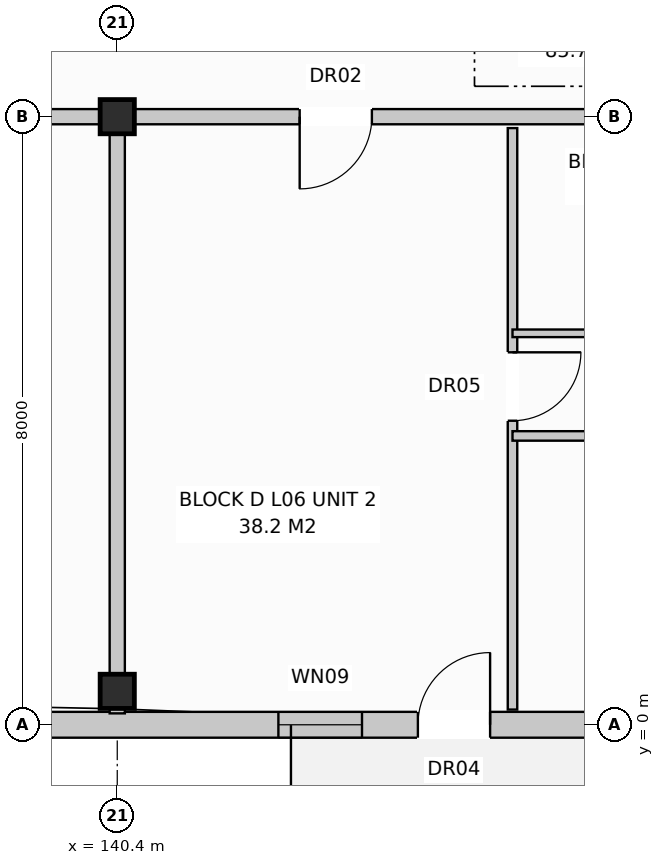
"""IFC4 building model, lengths in metres.
Left out: names, types, materials, properties, quantities, classifications, styles, units other than length and angle.
Written with IfcOpenShell. Run it as: python <this file> out.ifc"""

import sys

from ifc_helpers import new_model, si_unit, direction, frame, frame_2d, origin, origin_with_axes, origin_2d, place, context, subcontext, project, spatial, rectangle, extrude, element, fill, save


model = new_model("IFC4")
c1 = context("Model", 3, precision=1e-05, world=origin(), true_north=direction((0.0, 1.0)))
c2 = subcontext(c1, "Body", "Model", "MODEL_VIEW")
j1 = project(units=[si_unit("LENGTHUNIT", "METRE"), si_unit("PLANEANGLEUNIT", "RADIAN")], contexts=[c1])
p1 = place(None, origin())
s1 = spatial("IfcSite", under=j1, at=p1, CompositionType="ELEMENT")
p2 = place(p1, origin())
s2 = spatial("IfcBuilding", under=s1, at=p2, CompositionType="ELEMENT")
p3 = place(p2, frame((0.0, 0.0, 20.8)))
s3 = spatial("IfcBuildingStorey", under=s2, at=p3, CompositionType="ELEMENT", Elevation=20.8)
for number, where, z_axis, x_axis in (
    (1, (140.4, 0.44, 0.0), (0.0, 0.0, 1.0), (1.0, 0.0, 0.0)),
    (2, (140.4, 8.0, 0.0), (0.0, 0.0, 1.0), (1.0, 0.0, 0.0)),
):
    element("IfcColumn", number, at=place(p3, frame(where, z_axis=z_axis, x_axis=x_axis)), inside=s3, PredefinedType="COLUMN", context=c2, shape_type="SweptSolid", body=[
        extrude(rectangle(XDim=0.45, YDim=0.45, at=origin_2d()), origin(), (0.0, 0.0, 1.0), 3.2),
    ])
p4 = place(p3, frame((126.76, 0.0, 0.0), z_axis=(0.0, 0.0, 1.0), x_axis=(1.0, 0.0, 0.0)))
e3 = element("IfcWall", 3, at=p4, inside=s3, PredefinedType="STANDARD", context=c2, shape_type="SweptSolid", body=[
    extrude(rectangle(XDim=41.08, YDim=0.34, at=frame_2d((20.54, 0.0))), origin(), (0.0, 0.0, 1.0), 2.95),
])
p5 = place(p4, frame((2.795, 0.0, 0.0)))
e4 = element("IfcOpeningElement", 4, at=p5, cuts=e3, PredefinedType="OPENING", context=c2, shape_type="SweptSolid", body=[
    extrude(rectangle(XDim=0.95, YDim=2.1, at=frame_2d((0.475, 1.05))), frame((0.0, 0.182, 0.0), z_axis=(0.0, -1.0, 0.0), x_axis=(1.0, 0.0, 0.0)), (0.0, 0.0, 1.0), 0.364),
])
p6 = place(p4, frame((17.595, 0.0, 0.0)))
e5 = element("IfcOpeningElement", 5, at=p6, cuts=e3, PredefinedType="OPENING", context=c2, shape_type="SweptSolid", body=[
    extrude(rectangle(XDim=0.95, YDim=2.1, at=frame_2d((0.475, 1.05))), frame((0.0, 0.182, 0.0), z_axis=(0.0, -1.0, 0.0), x_axis=(1.0, 0.0, 0.0)), (0.0, 0.0, 1.0), 0.364),
])
p7 = place(p4, frame((30.095, 0.0, 0.0)))
e6 = element("IfcOpeningElement", 6, at=p7, cuts=e3, PredefinedType="OPENING", context=c2, shape_type="SweptSolid", body=[
    extrude(rectangle(XDim=0.95, YDim=2.1, at=frame_2d((0.475, 1.05))), frame((0.0, 0.182, 0.0), z_axis=(0.0, -1.0, 0.0), x_axis=(1.0, 0.0, 0.0)), (0.0, 0.0, 1.0), 0.364),
])
p8 = place(p4, frame((0.63, 0.0, 0.8)))
e7 = element("IfcOpeningElement", 7, at=p8, cuts=e3, PredefinedType="OPENING", context=c2, shape_type="SweptSolid", body=[
    extrude(rectangle(XDim=1.8, YDim=1.7, at=frame_2d((0.9, 0.85))), frame((0.0, 0.182, 0.0), z_axis=(0.0, -1.0, 0.0), x_axis=(1.0, 0.0, 0.0)), (0.0, 0.0, 1.0), 0.364),
])
p9 = place(p4, frame((4.36, 0.0, 0.72)))
e8 = element("IfcOpeningElement", 8, at=p9, cuts=e3, PredefinedType="OPENING", context=c2, shape_type="SweptSolid", body=[
    extrude(rectangle(XDim=1.9, YDim=1.85, at=frame_2d((0.95, 0.925))), frame((0.0, 0.182, 0.0), z_axis=(0.0, -1.0, 0.0), x_axis=(1.0, 0.0, 0.0)), (0.0, 0.0, 1.0), 0.364),
])
p10 = place(p4, frame((10.46, 0.0, 0.72)))
e9 = element("IfcOpeningElement", 9, at=p10, cuts=e3, PredefinedType="OPENING", context=c2, shape_type="SweptSolid", body=[
    extrude(rectangle(XDim=1.1, YDim=1.5, at=frame_2d((0.55, 0.75))), frame((0.0, 0.182, 0.0), z_axis=(0.0, -1.0, 0.0), x_axis=(1.0, 0.0, 0.0)), (0.0, 0.0, 1.0), 0.364),
])
p11 = place(p4, frame((15.76, 0.0, 0.72)))
e10 = element("IfcOpeningElement", 10, at=p11, cuts=e3, PredefinedType="OPENING", context=c2, shape_type="SweptSolid", body=[
    extrude(rectangle(XDim=1.1, YDim=1.5, at=frame_2d((0.55, 0.75))), frame((0.0, 0.182, 0.0), z_axis=(0.0, -1.0, 0.0), x_axis=(1.0, 0.0, 0.0)), (0.0, 0.0, 1.0), 0.364),
])
p12 = place(p4, frame((21.042, 0.0, 0.72)))
e11 = element("IfcOpeningElement", 11, at=p12, cuts=e3, PredefinedType="OPENING", context=c2, shape_type="SweptSolid", body=[
    extrude(rectangle(XDim=1.9, YDim=1.85, at=frame_2d((0.95, 0.925))), frame((0.0, 0.182, 0.0), z_axis=(0.0, -1.0, 0.0), x_axis=(1.0, 0.0, 0.0)), (0.0, 0.0, 1.0), 0.364),
])
p13 = place(p4, frame((24.66, 0.0, 0.72)))
e12 = element("IfcOpeningElement", 12, at=p13, cuts=e3, PredefinedType="OPENING", context=c2, shape_type="SweptSolid", body=[
    extrude(rectangle(XDim=1.1, YDim=1.5, at=frame_2d((0.55, 0.75))), frame((0.0, 0.182, 0.0), z_axis=(0.0, -1.0, 0.0), x_axis=(1.0, 0.0, 0.0)), (0.0, 0.0, 1.0), 0.364),
])
p14 = place(p4, frame((28.21, 0.0, 0.85)))
e13 = element("IfcOpeningElement", 13, at=p14, cuts=e3, PredefinedType="OPENING", context=c2, shape_type="SweptSolid", body=[
    extrude(rectangle(XDim=1.5, YDim=1.65, at=frame_2d((0.75, 0.825))), frame((0.0, 0.182, 0.0), z_axis=(0.0, -1.0, 0.0), x_axis=(1.0, 0.0, 0.0)), (0.0, 0.0, 1.0), 0.364),
])
p15 = place(p4, frame((31.86, 0.0, 0.72)))
e14 = element("IfcOpeningElement", 14, at=p15, cuts=e3, PredefinedType="OPENING", context=c2, shape_type="SweptSolid", body=[
    extrude(rectangle(XDim=1.9, YDim=1.85, at=frame_2d((0.95, 0.925))), frame((0.0, 0.182, 0.0), z_axis=(0.0, -1.0, 0.0), x_axis=(1.0, 0.0, 0.0)), (0.0, 0.0, 1.0), 0.364),
])
p16 = place(p4, frame((35.335, 0.0, 0.8)))
e15 = element("IfcOpeningElement", 15, at=p16, cuts=e3, PredefinedType="OPENING", context=c2, shape_type="SweptSolid", body=[
    extrude(rectangle(XDim=1.95, YDim=1.65, at=frame_2d((0.975, 0.825))), frame((0.0, 0.182, 0.0), z_axis=(0.0, -1.0, 0.0), x_axis=(1.0, 0.0, 0.0)), (0.0, 0.0, 1.0), 0.364),
])
p17 = place(p4, frame((38.65, 0.0, 0.8)))
e16 = element("IfcOpeningElement", 16, at=p17, cuts=e3, PredefinedType="OPENING", context=c2, shape_type="SweptSolid", body=[
    extrude(rectangle(XDim=1.8, YDim=1.7, at=frame_2d((0.9, 0.85))), frame((0.0, 0.182, 0.0), z_axis=(0.0, -1.0, 0.0), x_axis=(1.0, 0.0, 0.0)), (0.0, 0.0, 1.0), 0.364),
])
p18 = place(p3, frame((140.4, 7.85, 0.0), z_axis=(0.0, 0.0, 1.0), x_axis=(0.0, -1.0, 0.0)))
e17 = element("IfcWall", 17, at=p18, inside=s3, PredefinedType="PARTITIONING", context=c2, shape_type="SweptSolid", body=[
    extrude(rectangle(XDim=7.7, YDim=0.2, at=frame_2d((3.85, 0.0))), origin(), (0.0, 0.0, 1.0), 2.95),
])
p19 = place(p3, frame((126.6, 8.0, 0.0), z_axis=(0.0, 0.0, 1.0), x_axis=(1.0, 0.0, 0.0)))
e18 = element("IfcWall", 18, at=p19, inside=s3, PredefinedType="PARTITIONING", context=c2, shape_type="SweptSolid", body=[
    extrude(rectangle(XDim=13.8, YDim=0.2, at=frame_2d((6.9, 0.0))), origin(), (0.0, 0.0, 1.0), 2.39),
])
p20 = place(p19, frame((9.6, 0.0, 0.0)))
e19 = element("IfcOpeningElement", 19, at=p20, cuts=e18, PredefinedType="OPENING", context=c2, shape_type="SweptSolid", body=[
    extrude(rectangle(XDim=0.95, YDim=2.15, at=frame_2d((0.475, 1.075))), frame((0.0, 0.112, 0.0), z_axis=(0.0, -1.0, 0.0), x_axis=(1.0, 0.0, 0.0)), (0.0, 0.0, 1.0), 0.224),
])
p21 = place(p3, frame((140.4, 8.0, 0.0), z_axis=(0.0, 0.0, 1.0), x_axis=(1.0, 0.0, 0.0)))
e20 = element("IfcWall", 20, at=p21, inside=s3, PredefinedType="PARTITIONING", context=c2, shape_type="SweptSolid", body=[
    extrude(rectangle(XDim=13.8, YDim=0.2, at=frame_2d((6.9, 0.0))), origin(), (0.0, 0.0, 1.0), 2.39),
])
p22 = place(p21, frame((2.4, 0.0, 0.0)))
e21 = element("IfcOpeningElement", 21, at=p22, cuts=e20, PredefinedType="OPENING", context=c2, shape_type="SweptSolid", body=[
    extrude(rectangle(XDim=0.95, YDim=2.15, at=frame_2d((0.475, 1.075))), frame((0.0, 0.112, 0.0), z_axis=(0.0, -1.0, 0.0), x_axis=(1.0, 0.0, 0.0)), (0.0, 0.0, 1.0), 0.224),
])
p23 = place(p3, frame((145.6, 7.85, 0.0), z_axis=(0.0, 0.0, 1.0), x_axis=(0.0, -1.0, 0.0)))
e22 = element("IfcWall", 22, at=p23, inside=s3, PredefinedType="PARTITIONING", context=c2, shape_type="SweptSolid", body=[
    extrude(rectangle(XDim=7.65, YDim=0.125, at=frame_2d((3.825, 0.0))), origin(), (0.0, 0.0, 1.0), 2.95),
])
p24 = place(p23, frame((2.95, 0.0, 0.0)))
e23 = element("IfcOpeningElement", 23, at=p24, cuts=e22, PredefinedType="OPENING", context=c2, shape_type="SweptSolid", body=[
    extrude(rectangle(XDim=0.9, YDim=2.1, at=frame_2d((0.45, 1.05))), frame((0.0, 0.074, 0.0), z_axis=(0.0, -1.0, 0.0), x_axis=(1.0, 0.0, 0.0)), (0.0, 0.0, 1.0), 0.149),
])
p25 = place(p3, frame((145.6, 5.15, 0.0), z_axis=(0.0, 0.0, 1.0), x_axis=(1.0, 0.0, 0.0)))
e24 = element("IfcWall", 24, at=p25, inside=s3, PredefinedType="PARTITIONING", context=c2, shape_type="SweptSolid", body=[
    extrude(rectangle(XDim=8.5, YDim=0.1, at=frame_2d((4.25, 0.0))), origin(), (0.0, 0.0, 1.0), 2.95),
])
p26 = place(p25, frame((1.0, 0.0, 0.0)))
e25 = element("IfcOpeningElement", 25, at=p26, cuts=e24, PredefinedType="OPENING", context=c2, shape_type="SweptSolid", body=[
    extrude(rectangle(XDim=0.85, YDim=2.1, at=frame_2d((0.425, 1.05))), frame((0.0, 0.062, 0.0), z_axis=(0.0, -1.0, 0.0), x_axis=(1.0, 0.0, 0.0)), (0.0, 0.0, 1.0), 0.124),
])
p27 = place(p25, frame((3.4, 0.0, 0.0)))
e26 = element("IfcOpeningElement", 26, at=p27, cuts=e24, PredefinedType="OPENING", context=c2, shape_type="SweptSolid", body=[
    extrude(rectangle(XDim=0.85, YDim=2.05, at=frame_2d((0.425, 1.025))), frame((0.0, 0.062, 0.0), z_axis=(0.0, -1.0, 0.0), x_axis=(1.0, 0.0, 0.0)), (0.0, 0.0, 1.0), 0.124),
])
p28 = place(p25, frame((6.2, 0.0, 0.0)))
e27 = element("IfcOpeningElement", 27, at=p28, cuts=e24, PredefinedType="OPENING", context=c2, shape_type="SweptSolid", body=[
    extrude(rectangle(XDim=0.85, YDim=2.05, at=frame_2d((0.425, 1.025))), frame((0.0, 0.062, 0.0), z_axis=(0.0, -1.0, 0.0), x_axis=(1.0, 0.0, 0.0)), (0.0, 0.0, 1.0), 0.124),
])
p29 = place(p3, frame((145.6, 3.8, 0.0), z_axis=(0.0, 0.0, 1.0), x_axis=(1.0, 0.0, 0.0)))
e28 = element("IfcWall", 28, at=p29, inside=s3, PredefinedType="PARTITIONING", context=c2, shape_type="SweptSolid", body=[
    extrude(rectangle(XDim=8.5, YDim=0.125, at=frame_2d((4.25, 0.0))), origin(), (0.0, 0.0, 1.0), 2.95),
])
p30 = place(p29, frame((1.5, 0.0, 0.0)))
e29 = element("IfcOpeningElement", 29, at=p30, cuts=e28, PredefinedType="OPENING", context=c2, shape_type="SweptSolid", body=[
    extrude(rectangle(XDim=0.9, YDim=2.1, at=frame_2d((0.45, 1.05))), frame((0.0, 0.074, 0.0), z_axis=(0.0, -1.0, 0.0), x_axis=(1.0, 0.0, 0.0)), (0.0, 0.0, 1.0), 0.149),
])
p31 = place(p29, frame((5.6, 0.0, 0.0)))
e30 = element("IfcOpeningElement", 30, at=p31, cuts=e28, PredefinedType="OPENING", context=c2, shape_type="SweptSolid", body=[
    extrude(rectangle(XDim=0.9, YDim=2.1, at=frame_2d((0.45, 1.05))), frame((0.0, 0.074, 0.0), z_axis=(0.0, -1.0, 0.0), x_axis=(1.0, 0.0, 0.0)), (0.0, 0.0, 1.0), 0.149),
])
p32 = place(p6, origin_with_axes())
e31 = element("IfcDoor", 31, at=p32, inside=s3, OperationType="SINGLE_SWING_RIGHT", PredefinedType="DOOR", context=c2, shape_type="SweptSolid", body=[
    extrude(rectangle(XDim=0.95, YDim=2.1, at=frame_2d((0.475, 1.05))), frame((0.0, 0.025, 0.0), z_axis=(0.0, -1.0, 0.0), x_axis=(1.0, 0.0, 0.0)), (0.0, 0.0, 1.0), 0.05),
])
fill(e5, e31)
p33 = place(p11, origin_with_axes())
e32 = element("IfcWindow", 32, at=p33, inside=s3, PartitioningType="SINGLE_PANEL", PredefinedType="WINDOW", context=c2, shape_type="SweptSolid", body=[
    extrude(rectangle(XDim=1.1, YDim=1.5, at=frame_2d((0.55, 0.75))), frame((0.0, 0.03, 0.0), z_axis=(0.0, -1.0, 0.0), x_axis=(1.0, 0.0, 0.0)), (0.0, 0.0, 1.0), 0.06),
])
fill(e10, e32)
p34 = place(p22, frame((0.95, 0.0, 0.0), z_axis=(0.0, 0.0, 1.0), x_axis=(-1.0, 0.0, 0.0)))
e33 = element("IfcDoor", 33, at=p34, inside=s3, OperationType="SINGLE_SWING_LEFT", PredefinedType="DOOR", context=c2, shape_type="SweptSolid", body=[
    extrude(rectangle(XDim=0.95, YDim=2.15, at=frame_2d((0.475, 1.075))), frame((0.0, 0.025, 0.0), z_axis=(0.0, -1.0, 0.0), x_axis=(1.0, 0.0, 0.0)), (0.0, 0.0, 1.0), 0.05),
])
fill(e21, e33)
p35 = place(p24, origin_with_axes())
e34 = element("IfcDoor", 34, at=p35, inside=s3, OperationType="SINGLE_SWING_LEFT", PredefinedType="DOOR", context=c2, shape_type="SweptSolid", body=[
    extrude(rectangle(XDim=0.9, YDim=2.1, at=frame_2d((0.45, 1.05))), frame((0.0, 0.025, 0.0), z_axis=(0.0, -1.0, 0.0), x_axis=(1.0, 0.0, 0.0)), (0.0, 0.0, 1.0), 0.05),
])
fill(e23, e34)
save(model, sys.argv[1])
